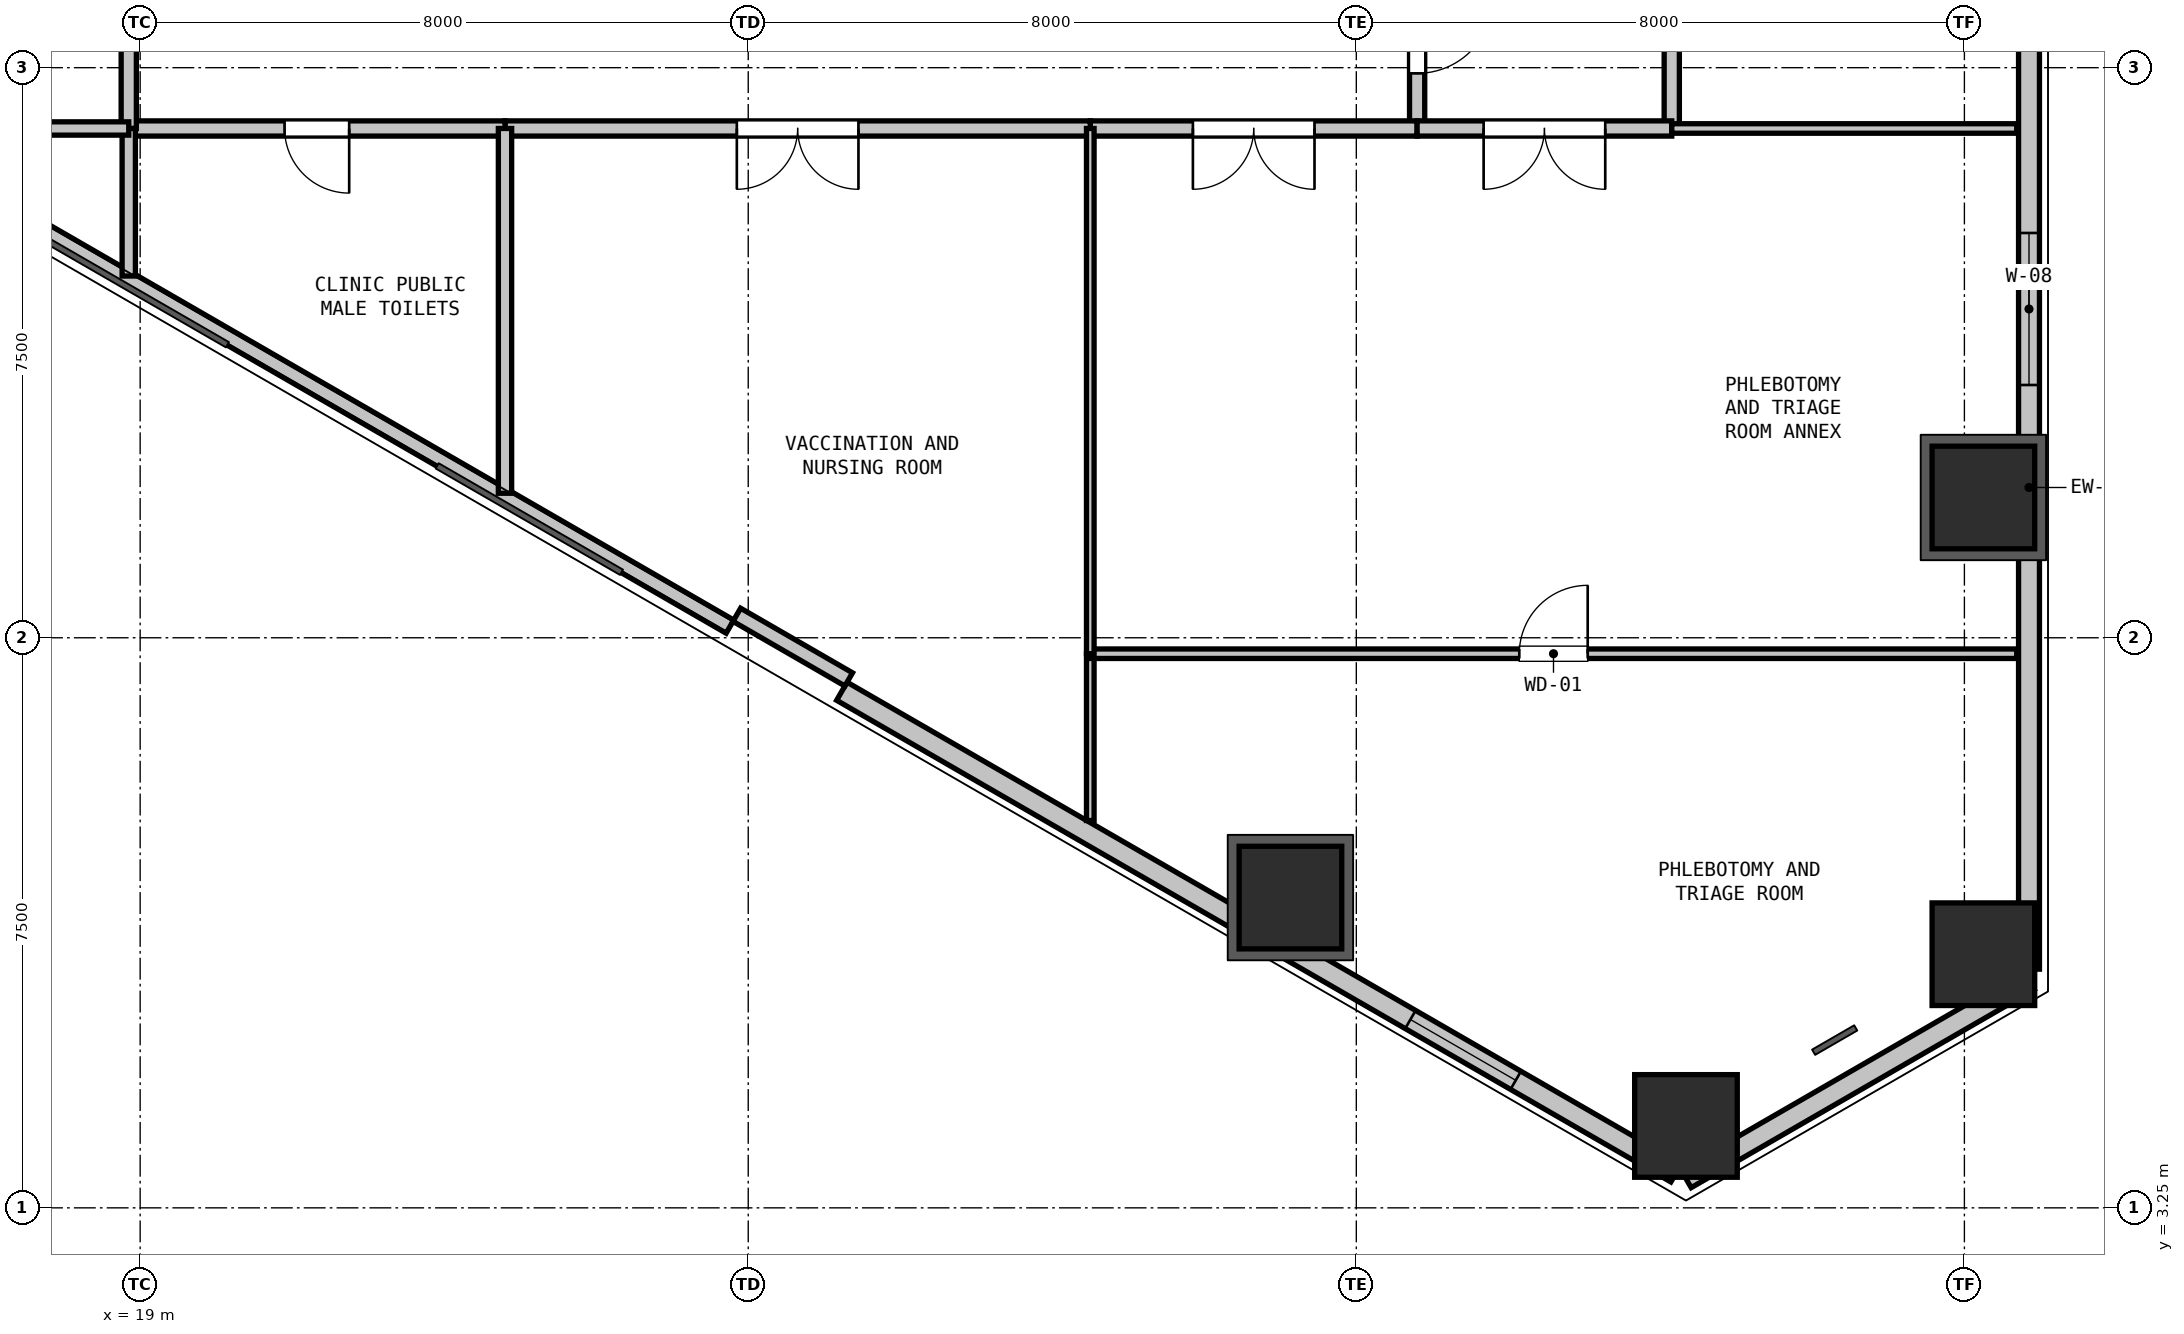
"""IFC4 building model, lengths in metres.
Left out: names, types, materials, properties, quantities, classifications, styles, units other than length and angle.
Written with IfcOpenShell. Run it as: python <this file> out.ifc"""

import sys

from ifc_helpers import new_model, si_unit, direction, frame, frame_2d, origin, origin_2d, place, context, subcontext, project, spatial, rectangle, hollow_rectangle, extrude, element, fill, save


model = new_model("IFC4")
c1 = context("Model", 3, precision=1e-05, world=origin(), true_north=direction((0.0, 1.0)))
c2 = subcontext(c1, "Body", "Model", "MODEL_VIEW")
j1 = project(units=[si_unit("LENGTHUNIT", "METRE"), si_unit("PLANEANGLEUNIT", "RADIAN")], contexts=[c1])
p1 = place(None, origin())
s1 = spatial("IfcSite", under=j1, at=p1, CompositionType="ELEMENT")
p2 = place(p1, origin())
s2 = spatial("IfcBuilding", under=s1, at=p2, CompositionType="ELEMENT")
p3 = place(p2, frame((0.0, 0.0, 9.6)))
s3 = spatial("IfcBuildingStorey", under=s2, at=p3, CompositionType="ELEMENT", Elevation=9.6)
for number, where, z_axis, x_axis in (
    (1, (43.25, 12.595, -0.32), (0.0, 0.0, 1.0), (1.0, 0.0, 0.0)),
    (2, (43.25, 6.587, -0.32), (0.0, 0.0, 1.0), (1.0, 0.0, 0.0)),
    (3, (39.337, 4.327, -0.32), (0.0, 0.0, 1.0), (1.0, 0.0, 0.0)),
    (4, (34.133, 7.332, -0.32), (0.0, 0.0, 1.0), (1.0, 0.0, 0.0)),
):
    element("IfcColumn", number, at=place(p3, frame(where, z_axis=z_axis, x_axis=x_axis)), inside=s3, PredefinedType="COLUMN", context=c2, shape_type="SweptSolid", body=[
        extrude(hollow_rectangle(XDim=1.35, YDim=1.35, WallThickness=0.036, at=origin_2d()), origin(), (0.0, 0.0, 1.0), 5.12),
    ])
p4 = place(p3, frame((43.85, 6.24, 0.0), z_axis=(0.0, 0.0, 1.0), x_axis=(-0.866043601342, -0.499968479581, 0.0)))
e5 = element("IfcWall", 5, at=p4, inside=s3, PredefinedType="SOLIDWALL", context=c2, shape_type="SweptSolid", body=[
    extrude(rectangle(XDim=5.211, YDim=0.275, at=frame_2d((2.605, 0.0))), origin(), (0.0, 0.0, 1.0), 4.1),
])
p5 = place(p3, frame((43.85, 19.063, 0.0), z_axis=(0.0, 0.0, 1.0), x_axis=(0.0, -1.0, 0.0)))
e6 = element("IfcWall", 6, at=p5, inside=s3, PredefinedType="SOLIDWALL", context=c2, shape_type="SweptSolid", body=[
    extrude(rectangle(XDim=12.673, YDim=0.275, at=frame_2d((6.336, 0.0))), origin(), (0.0, 0.0, 1.0), 4.1),
])
p6 = place(p5, frame((2.988, 0.0, 0.9)))
e7 = element("IfcOpeningElement", 7, at=p6, cuts=e6, PredefinedType="OPENING", context=c2, shape_type="SweptSolid", body=[
    extrude(rectangle(XDim=2.0, YDim=1.8, at=frame_2d((1.0, 0.9))), frame((0.0, 0.147, 0.0), z_axis=(0.0, -1.0, 0.0), x_axis=(1.0, 0.0, 0.0)), (0.0, 0.0, 1.0), 0.295),
])
p7 = place(p3, frame((39.207, 3.71, 0.0), z_axis=(0.0, 0.0, 1.0), x_axis=(-0.86603192154, 0.499988710747, 0.0)))
e8 = element("IfcWall", 8, at=p7, inside=s3, PredefinedType="SOLIDWALL", context=c2, shape_type="SweptSolid", body=[
    extrude(rectangle(XDim=12.673, YDim=0.275, at=frame_2d((6.336, 0.0))), origin(), (0.0, 0.0, 1.0), 4.1),
])
p8 = place(p7, frame((2.436, 0.0, 0.9)))
e9 = element("IfcOpeningElement", 9, at=p8, cuts=e8, PredefinedType="OPENING", context=c2, shape_type="SweptSolid", body=[
    extrude(rectangle(XDim=1.6, YDim=1.8, at=frame_2d((0.8, 0.9))), frame((0.0, 0.147, 0.0), z_axis=(0.0, -1.0, 0.0), x_axis=(1.0, 0.0, 0.0)), (0.0, 0.0, 1.0), 0.295),
])
p9 = place(p3, frame((26.76, 10.896, 0.0), z_axis=(0.0, 0.0, 1.0), x_axis=(-0.866027351828, 0.499996625875, 0.0)))
e10 = element("IfcWall", 10, at=p9, inside=s3, PredefinedType="PARAPET", context=c2, shape_type="SweptSolid", body=[
    extrude(rectangle(XDim=11.973, YDim=0.2, at=frame_2d((5.987, 0.0))), origin(), (0.0, 0.0, 1.0), 0.2),
])
p10 = place(p3, frame((28.322, 10.202, 0.0), z_axis=(0.0, 0.0, 1.0), x_axis=(-0.86605165483, 0.499954529098, 0.0)))
e11 = element("IfcWall", 11, at=p10, inside=s3, PredefinedType="PARAPET", context=c2, shape_type="SweptSolid", body=[
    extrude(rectangle(XDim=1.7, YDim=0.2, at=frame_2d((0.85, 0.0))), origin(), (0.0, 0.0, 1.0), 4.1),
])
p11 = place(p3, frame((35.8, 19.9, 0.0), z_axis=(0.0, 0.0, 1.0), x_axis=(0.0, -1.0, 0.0)))
e12 = element("IfcWall", 12, at=p11, inside=s3, PredefinedType="PARTITIONING", context=c2, shape_type="SweptSolid", body=[
    extrude(rectangle(XDim=2.45, YDim=0.2, at=frame_2d((1.225, 0.0))), origin(), (0.0, 0.0, 1.0), 4.48),
])
p12 = place(p11, frame((0.725, 0.0, 0.0)))
e13 = element("IfcOpeningElement", 13, at=p12, cuts=e12, PredefinedType="OPENING", context=c2, shape_type="SweptSolid", body=[
    extrude(rectangle(XDim=1.0, YDim=2.15, at=frame_2d((0.5, 1.075))), frame((0.0, 0.11, 0.0), z_axis=(0.0, -1.0, 0.0), x_axis=(1.0, 0.0, 0.0)), (0.0, 0.0, 1.0), 0.22),
])
p13 = place(p3, frame((35.8, 17.45, 0.0), z_axis=(0.0, 0.0, 1.0), x_axis=(-1.0, 0.0, 0.0)))
e14 = element("IfcWall", 14, at=p13, inside=s3, PredefinedType="PARTITIONING", context=c2, shape_type="SweptSolid", body=[
    extrude(rectangle(XDim=4.3, YDim=0.2, at=frame_2d((2.15, 0.0))), origin(), (0.0, 0.0, 1.0), 4.48),
])
p14 = place(p13, frame((1.35, 0.0, 0.0)))
e15 = element("IfcOpeningElement", 15, at=p14, cuts=e14, PredefinedType="OPENING", context=c2, shape_type="SweptSolid", body=[
    extrude(rectangle(XDim=1.6, YDim=2.2, at=frame_2d((0.8, 1.1))), frame((0.0, 0.11, 0.0), z_axis=(0.0, -1.0, 0.0), x_axis=(1.0, 0.0, 0.0)), (0.0, 0.0, 1.0), 0.22),
])
p15 = place(p3, frame((31.5, 17.45, 0.0), z_axis=(0.0, 0.0, 1.0), x_axis=(-1.0, 0.0, 0.0)))
e16 = element("IfcWall", 16, at=p15, inside=s3, PredefinedType="PARTITIONING", context=c2, shape_type="SweptSolid", body=[
    extrude(rectangle(XDim=7.7, YDim=0.2, at=frame_2d((3.85, 0.0))), origin(), (0.0, 0.0, 1.0), 3.777),
])
p16 = place(p15, frame((3.05, 0.0, 0.0)))
e17 = element("IfcOpeningElement", 17, at=p16, cuts=e16, PredefinedType="OPENING", context=c2, shape_type="SweptSolid", body=[
    extrude(rectangle(XDim=1.6, YDim=2.2, at=frame_2d((0.8, 1.1))), frame((0.0, 0.11, 0.0), z_axis=(0.0, -1.0, 0.0), x_axis=(1.0, 0.0, 0.0)), (0.0, 0.0, 1.0), 0.22),
])
p17 = place(p3, frame((23.8, 17.45, 0.0), z_axis=(0.0, 0.0, 1.0), x_axis=(-1.0, 0.0, 0.0)))
e18 = element("IfcWall", 18, at=p17, inside=s3, PredefinedType="PARTITIONING", context=c2, shape_type="SweptSolid", body=[
    extrude(rectangle(XDim=4.95, YDim=0.2, at=frame_2d((2.475, 0.0))), origin(), (0.0, 0.0, 1.0), 4.48),
])
p18 = place(p17, frame((2.05, 0.0, 0.0)))
e19 = element("IfcOpeningElement", 19, at=p18, cuts=e18, PredefinedType="OPENING", context=c2, shape_type="SweptSolid", body=[
    extrude(rectangle(XDim=0.85, YDim=2.1, at=frame_2d((0.425, 1.05))), frame((0.0, 0.11, 0.0), z_axis=(0.0, -1.0, 0.0), x_axis=(1.0, 0.0, 0.0)), (0.0, 0.0, 1.0), 0.22),
])
p19 = place(p3, frame((18.85, 17.45, 0.0), z_axis=(0.0, 0.0, 1.0), x_axis=(0.0, 1.0, 0.0)))
e20 = element("IfcWall", 20, at=p19, inside=s3, PredefinedType="PARTITIONING", context=c2, shape_type="SweptSolid", body=[
    extrude(rectangle(XDim=5.35, YDim=0.2, at=frame_2d((2.675, 0.0))), origin(), (0.0, 0.0, 1.0), 3.777),
])
p20 = place(p19, frame((2.25, 0.0, 0.0)))
e21 = element("IfcOpeningElement", 21, at=p20, cuts=e20, PredefinedType="OPENING", context=c2, shape_type="SweptSolid", body=[
    extrude(rectangle(XDim=0.85, YDim=2.1, at=frame_2d((0.425, 1.05))), frame((0.0, 0.11, 0.0), z_axis=(0.0, -1.0, 0.0), x_axis=(1.0, 0.0, 0.0)), (0.0, 0.0, 1.0), 0.22),
])
p21 = place(p3, frame((39.15, 26.75, 0.0), z_axis=(0.0, 0.0, 1.0), x_axis=(0.0, -1.0, 0.0)))
e22 = element("IfcWall", 22, at=p21, inside=s3, PredefinedType="PARTITIONING", context=c2, shape_type="SweptSolid", body=[
    extrude(rectangle(XDim=9.3, YDim=0.2, at=frame_2d((4.65, 0.0))), origin(), (0.0, 0.0, 1.0), 4.48),
])
p22 = place(p21, frame((3.85, 0.0, 0.0)))
e23 = element("IfcOpeningElement", 23, at=p22, cuts=e22, PredefinedType="OPENING", context=c2, shape_type="SweptSolid", body=[
    extrude(rectangle(XDim=1.6, YDim=2.2, at=frame_2d((0.8, 1.1))), frame((0.0, 0.11, 0.0), z_axis=(0.0, -1.0, 0.0), x_axis=(1.0, 0.0, 0.0)), (0.0, 0.0, 1.0), 0.22),
])
p23 = place(p3, frame((39.15, 17.45, 0.0), z_axis=(0.0, 0.0, 1.0), x_axis=(-1.0, 0.0, 0.0)))
e24 = element("IfcWall", 24, at=p23, inside=s3, PredefinedType="PARTITIONING", context=c2, shape_type="SweptSolid", body=[
    extrude(rectangle(XDim=3.35, YDim=0.2, at=frame_2d((1.675, 0.0))), origin(), (0.0, 0.0, 1.0), 3.777),
])
p24 = place(p23, frame((0.875, 0.0, 0.0)))
e25 = element("IfcOpeningElement", 25, at=p24, cuts=e24, PredefinedType="OPENING", context=c2, shape_type="SweptSolid", body=[
    extrude(rectangle(XDim=1.6, YDim=2.2, at=frame_2d((0.8, 1.1))), frame((0.0, 0.11, 0.0), z_axis=(0.0, -1.0, 0.0), x_axis=(1.0, 0.0, 0.0)), (0.0, 0.0, 1.0), 0.22),
])
p25 = place(p3, frame((23.8, 17.45, 0.0), z_axis=(0.0, 0.0, 1.0), x_axis=(0.0, -1.0, 0.0)))
e26 = element("IfcWall", 26, at=p25, inside=s3, PredefinedType="PLUMBINGWALL", context=c2, shape_type="SweptSolid", body=[
    extrude(rectangle(XDim=4.799, YDim=0.175, at=frame_2d((2.399, 0.0))), origin(), (0.0, 0.0, 1.0), 4.09),
])
p26 = place(p3, frame((18.85, 15.509, 0.0), z_axis=(0.0, 0.0, 1.0), x_axis=(0.0, 1.0, 0.0)))
e27 = element("IfcWall", 27, at=p26, inside=s3, PredefinedType="PLUMBINGWALL", context=c2, shape_type="SweptSolid", body=[
    extrude(rectangle(XDim=1.941, YDim=0.175, at=frame_2d((0.97, 0.0))), origin(), (0.0, 0.0, 1.0), 4.09),
])
p27 = place(p3, frame((18.85, 17.45, 0.0), z_axis=(0.0, 0.0, 1.0), x_axis=(-1.0, 0.0, 0.0)))
e28 = element("IfcWall", 28, at=p27, inside=s3, PredefinedType="PLUMBINGWALL", context=c2, shape_type="SweptSolid", body=[
    extrude(rectangle(XDim=2.857, YDim=0.175, at=frame_2d((1.428, 0.0))), origin(), (0.0, 0.0, 1.0), 4.09),
])
p28 = place(p3, frame((43.688, 17.45, 0.0), z_axis=(0.0, 0.0, 1.0), x_axis=(-1.0, 0.0, 0.0)))
e29 = element("IfcWall", 29, at=p28, inside=s3, PredefinedType="PARTITIONING", context=c2, shape_type="SweptSolid", body=[
    extrude(rectangle(XDim=4.539, YDim=0.125, at=frame_2d((2.269, 0.0))), origin(), (0.0, 0.0, 1.0), 4.09),
])
p29 = place(p3, frame((31.5, 8.346, 0.0), z_axis=(0.0, 0.0, 1.0), x_axis=(0.0, 1.0, 0.0)))
e30 = element("IfcWall", 30, at=p29, inside=s3, PredefinedType="PARTITIONING", context=c2, shape_type="SweptSolid", body=[
    extrude(rectangle(XDim=2.194, YDim=0.1, at=frame_2d((1.097, 0.0))), origin(), (0.0, 0.0, 1.0), 3.777),
])
p30 = place(p3, frame((31.5, 10.54, 0.0), z_axis=(0.0, 0.0, 1.0), x_axis=(1.0, 0.0, 0.0)))
e31 = element("IfcWall", 31, at=p30, inside=s3, PredefinedType="PARTITIONING", context=c2, shape_type="SweptSolid", body=[
    extrude(rectangle(XDim=12.188, YDim=0.125, at=frame_2d((6.094, 0.0))), origin(), (0.0, 0.0, 1.0), 3.777),
])
p31 = place(p30, frame((5.644, 0.0, 0.0)))
e32 = element("IfcOpeningElement", 32, at=p31, cuts=e31, PredefinedType="OPENING", context=c2, shape_type="SweptSolid", body=[
    extrude(rectangle(XDim=0.9, YDim=2.1, at=frame_2d((0.45, 1.05))), frame((0.0, 0.073, 0.0), z_axis=(0.0, -1.0, 0.0), x_axis=(1.0, 0.0, 0.0)), (0.0, 0.0, 1.0), 0.145),
])
p32 = place(p3, frame((31.5, 10.54, 0.0), z_axis=(0.0, 0.0, 1.0), x_axis=(0.0, 1.0, 0.0)))
e33 = element("IfcWall", 33, at=p32, inside=s3, PredefinedType="PARTITIONING", context=c2, shape_type="SweptSolid", body=[
    extrude(rectangle(XDim=6.91, YDim=0.1, at=frame_2d((3.455, 0.0))), origin(), (0.0, 0.0, 1.0), 4.48),
])
p33 = place(p6, origin())
e34 = element("IfcWindow", 34, at=p33, inside=s3, PartitioningType="SINGLE_PANEL", PredefinedType="WINDOW", context=c2, shape_type="SweptSolid", body=[
    extrude(rectangle(XDim=2.0, YDim=1.8, at=frame_2d((1.0, 0.9))), frame((0.0, 0.03, 0.0), z_axis=(0.0, -1.0, 0.0), x_axis=(1.0, 0.0, 0.0)), (0.0, 0.0, 1.0), 0.06),
])
fill(e7, e34)
p34 = place(p8, origin())
e35 = element("IfcWindow", 35, at=p34, inside=s3, PartitioningType="SINGLE_PANEL", PredefinedType="WINDOW", context=c2, shape_type="SweptSolid", body=[
    extrude(rectangle(XDim=1.6, YDim=1.8, at=frame_2d((0.8, 0.9))), frame((0.0, 0.03, 0.0), z_axis=(0.0, -1.0, 0.0), x_axis=(1.0, 0.0, 0.0)), (0.0, 0.0, 1.0), 0.06),
])
fill(e9, e35)
p35 = place(p12, origin())
e36 = element("IfcDoor", 36, at=p35, inside=s3, OperationType="SINGLE_SWING_LEFT", PredefinedType="DOOR", context=c2, shape_type="SweptSolid", body=[
    extrude(rectangle(XDim=1.0, YDim=2.15, at=frame_2d((0.5, 1.075))), frame((0.0, 0.025, 0.0), z_axis=(0.0, -1.0, 0.0), x_axis=(1.0, 0.0, 0.0)), (0.0, 0.0, 1.0), 0.05),
])
fill(e13, e36)
p36 = place(p18, origin())
e37 = element("IfcDoor", 37, at=p36, inside=s3, OperationType="SINGLE_SWING_LEFT", PredefinedType="DOOR", context=c2, shape_type="SweptSolid", body=[
    extrude(rectangle(XDim=0.85, YDim=2.1, at=frame_2d((0.425, 1.05))), frame((0.0, 0.025, 0.0), z_axis=(0.0, -1.0, 0.0), x_axis=(1.0, 0.0, 0.0)), (0.0, 0.0, 1.0), 0.05),
])
fill(e19, e37)
p37 = place(p14, origin())
e38 = element("IfcDoor", 38, at=p37, inside=s3, OperationType="DOUBLE_DOOR_SINGLE_SWING", PredefinedType="DOOR", context=c2, shape_type="SweptSolid", body=[
    extrude(rectangle(XDim=1.6, YDim=2.2, at=frame_2d((0.8, 1.1))), frame((0.0, 0.025, 0.0), z_axis=(0.0, -1.0, 0.0), x_axis=(1.0, 0.0, 0.0)), (0.0, 0.0, 1.0), 0.05),
])
fill(e15, e38)
p38 = place(p16, origin())
e39 = element("IfcDoor", 39, at=p38, inside=s3, OperationType="DOUBLE_DOOR_SINGLE_SWING", PredefinedType="DOOR", context=c2, shape_type="SweptSolid", body=[
    extrude(rectangle(XDim=1.6, YDim=2.2, at=frame_2d((0.8, 1.1))), frame((0.0, 0.025, 0.0), z_axis=(0.0, -1.0, 0.0), x_axis=(1.0, 0.0, 0.0)), (0.0, 0.0, 1.0), 0.05),
])
fill(e17, e39)
p39 = place(p24, origin())
e40 = element("IfcDoor", 40, at=p39, inside=s3, OperationType="DOUBLE_DOOR_SINGLE_SWING", PredefinedType="DOOR", context=c2, shape_type="SweptSolid", body=[
    extrude(rectangle(XDim=1.6, YDim=2.2, at=frame_2d((0.8, 1.1))), frame((0.0, 0.025, 0.0), z_axis=(0.0, -1.0, 0.0), x_axis=(1.0, 0.0, 0.0)), (0.0, 0.0, 1.0), 0.05),
])
fill(e25, e40)
p40 = place(p31, origin())
e41 = element("IfcDoor", 41, at=p40, inside=s3, OperationType="SINGLE_SWING_RIGHT", PredefinedType="DOOR", context=c2, shape_type="SweptSolid", body=[
    extrude(rectangle(XDim=0.9, YDim=2.1, at=frame_2d((0.45, 1.05))), frame((0.0, 0.025, 0.0), z_axis=(0.0, -1.0, 0.0), x_axis=(1.0, 0.0, 0.0)), (0.0, 0.0, 1.0), 0.05),
])
fill(e32, e41)
save(model, sys.argv[1])
